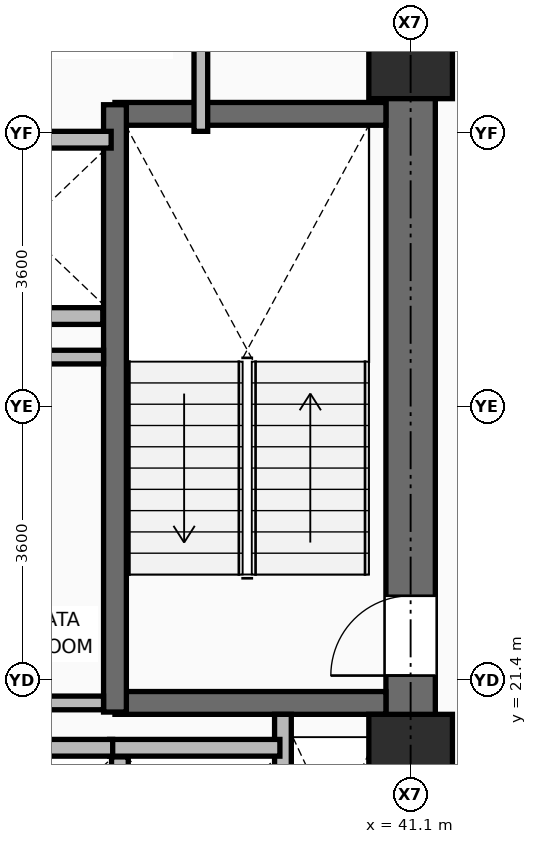
"""IFC4 building model, lengths in metres.
Left out: names, types, materials, properties, quantities, classifications, styles, units other than length and angle.
Written with IfcOpenShell. Run it as: python <this file> out.ifc"""

import sys

from ifc_helpers import new_model, si_unit, direction, frame, frame_2d, origin, origin_2d, place, context, subcontext, project, spatial, rectangle, extrude, element, fill, save


model = new_model("IFC4")
c1 = context("Model", 3, precision=1e-05, world=origin(), true_north=direction((0.0, 1.0)))
c2 = subcontext(c1, "Body", "Model", "MODEL_VIEW")
j1 = project(units=[si_unit("LENGTHUNIT", "METRE"), si_unit("PLANEANGLEUNIT", "RADIAN")], contexts=[c1])
p1 = place(None, origin())
s1 = spatial("IfcSite", under=j1, at=p1, CompositionType="ELEMENT")
p2 = place(p1, origin())
s2 = spatial("IfcBuilding", under=s1, at=p2, CompositionType="ELEMENT")
p3 = place(p2, frame((0.0, 0.0, 75.75)))
s3 = spatial("IfcBuildingStorey", under=s2, at=p3, CompositionType="ELEMENT", Elevation=75.75)
for number, where, z_axis, x_axis in (
    (1, (41.1, 20.4, 0.0), (0.0, 0.0, 1.0), (1.0, 0.0, 0.0)),
    (2, (41.1, 29.6, 0.0), (0.0, 0.0, 1.0), (1.0, 0.0, 0.0)),
):
    element("IfcColumn", number, at=place(p3, frame(where, z_axis=z_axis, x_axis=x_axis)), inside=s3, PredefinedType="COLUMN", context=c2, shape_type="SweptSolid", body=[
        extrude(rectangle(XDim=1.1, YDim=1.1, at=origin_2d()), origin(), (0.0, 0.0, 1.0), 3.75),
    ])
p4 = place(p3, frame((37.275, 18.08, 0.0), z_axis=(0.0, 0.0, 1.0), x_axis=(0.0, 1.0, 0.0)))
e3 = element("IfcWall", 3, at=p4, inside=s3, PredefinedType="PARTITIONING", context=c2, shape_type="SweptSolid", body=[
    extrude(rectangle(XDim=2.31, YDim=0.22, at=frame_2d((1.155, 0.0))), origin(), (0.0, 0.0, 1.0), 3.545),
])
p5 = place(p3, frame((34.91, 26.19, 0.0), z_axis=(0.0, 0.0, 1.0), x_axis=(1.0, 0.0, 0.0)))
e4 = element("IfcWall", 4, at=p5, inside=s3, PredefinedType="PARTITIONING", context=c2, shape_type="SweptSolid", body=[
    extrude(rectangle(XDim=2.14, YDim=0.22, at=frame_2d((1.07, 0.0))), origin(), (0.0, 0.0, 1.0), 3.545),
])
p6 = place(p3, frame((41.1, 18.125, 0.0), z_axis=(0.0, 0.0, 1.0), x_axis=(0.0, 1.0, 0.0)))
e5 = element("IfcWall", 5, at=p6, inside=s3, PredefinedType="SHEAR", context=c2, shape_type="SweptSolid", body=[
    extrude(rectangle(XDim=14.0, YDim=0.65, at=frame_2d((7.0, 0.0))), origin(), (0.0, 0.0, 1.0), 3.57),
])
p7 = place(p6, frame((3.335, 0.0, 0.0)))
e6 = element("IfcOpeningElement", 6, at=p7, cuts=e5, PredefinedType="OPENING", context=c2, shape_type="SweptSolid", body=[
    extrude(rectangle(XDim=1.05, YDim=2.1, at=frame_2d((0.525, 1.05))), frame((0.0, 0.335, 0.0), z_axis=(0.0, -1.0, 0.0), x_axis=(1.0, 0.0, 0.0)), (0.0, 0.0, 1.0), 0.67),
])
for number, where, z_axis, x_axis in (
    (7, (37.21, 21.1, 0.0), (0.0, 0.0, 1.0), (1.0, 0.0, 0.0)),
    (8, (37.21, 28.85, 0.0), (0.0, 0.0, 1.0), (1.0, 0.0, 0.0)),
):
    element("IfcWall", number, at=place(p3, frame(where, z_axis=z_axis, x_axis=x_axis)), inside=s3, PredefinedType="SHEAR", context=c2, shape_type="SweptSolid", body=[
        extrude(rectangle(XDim=3.565, YDim=0.3, at=frame_2d((1.782, 0.0))), origin(), (0.0, 0.0, 1.0), 3.57),
    ])
p8 = place(p3, frame((37.21, 20.98, 0.0), z_axis=(0.0, 0.0, 1.0), x_axis=(0.0, 1.0, 0.0)))
e9 = element("IfcWall", 9, at=p8, inside=s3, PredefinedType="SHEAR", context=c2, shape_type="SweptSolid", body=[
    extrude(rectangle(XDim=7.99, YDim=0.3, at=frame_2d((3.995, 0.0))), origin(), (0.0, 0.0, 1.0), 3.57),
])
p9 = place(p3, frame((39.42, 18.125, 0.0), z_axis=(0.0, 0.0, 1.0), x_axis=(0.0, 1.0, 0.0)))
e10 = element("IfcWall", 10, at=p9, inside=s3, PredefinedType="PARTITIONING", context=c2, shape_type="SweptSolid", body=[
    extrude(rectangle(XDim=2.825, YDim=0.22, at=frame_2d((1.413, 0.0))), origin(), (0.0, 0.0, 1.0), 3.55),
])
for number, where, z_axis, x_axis in (
    (11, (37.14, 20.51, 0.0), (0.0, 0.0, 1.0), (1.0, 0.0, 0.0)),
    (12, (34.94, 20.51, 0.0), (0.0, 0.0, 1.0), (1.0, 0.0, 0.0)),
):
    element("IfcWall", number, at=place(p3, frame(where, z_axis=z_axis, x_axis=x_axis)), inside=s3, PredefinedType="PARTITIONING", context=c2, shape_type="SweptSolid", body=[
        extrude(rectangle(XDim=2.24, YDim=0.22, at=frame_2d((1.12, 0.0))), origin(), (0.0, 0.0, 1.0), 3.55),
    ])
p10 = place(p3, frame((35.56, 28.51, 0.0), z_axis=(0.0, 0.0, 1.0), x_axis=(1.0, 0.0, 0.0)))
e13 = element("IfcWall", 13, at=p10, inside=s3, PredefinedType="PARTITIONING", context=c2, shape_type="SweptSolid", body=[
    extrude(rectangle(XDim=1.6, YDim=0.22, at=frame_2d((0.8, 0.0))), origin(), (0.0, 0.0, 1.0), 3.55),
])
p11 = place(p3, frame((34.98, 21.1, 0.0), z_axis=(0.0, 0.0, 1.0), x_axis=(1.0, 0.0, 0.0)))
e14 = element("IfcWall", 14, at=p11, inside=s3, PredefinedType="PARTITIONING", context=c2, shape_type="SweptSolid", body=[
    extrude(rectangle(XDim=2.08, YDim=0.18, at=frame_2d((1.04, 0.0))), origin(), (0.0, 0.0, 1.0), 3.55),
])
p12 = place(p3, frame((34.72, 25.65, 0.0), z_axis=(0.0, 0.0, 1.0), x_axis=(1.0, 0.0, 0.0)))
e15 = element("IfcWall", 15, at=p12, inside=s3, PredefinedType="PARTITIONING", context=c2, shape_type="SweptSolid", body=[
    extrude(rectangle(XDim=2.34, YDim=0.18, at=frame_2d((1.17, 0.0))), origin(), (0.0, 0.0, 1.0), 3.55),
])
p13 = place(p3, frame((38.34, 28.62, 0.0), z_axis=(0.0, 0.0, 1.0), x_axis=(0.0, 1.0, 0.0)))
e16 = element("IfcWall", 16, at=p13, inside=s3, PredefinedType="PARTITIONING", context=c2, shape_type="SweptSolid", body=[
    extrude(rectangle(XDim=3.505, YDim=0.18, at=frame_2d((1.752, 0.0))), origin(), (0.0, 0.0, 1.0), 3.55),
])
p14 = place(p7, origin())
e17 = element("IfcDoor", 17, at=p14, inside=s3, OperationType="SINGLE_SWING_LEFT", PredefinedType="DOOR", context=c2, shape_type="SweptSolid", body=[
    extrude(rectangle(XDim=1.05, YDim=2.1, at=frame_2d((0.525, 1.05))), frame((0.0, 0.025, 0.0), z_axis=(0.0, -1.0, 0.0), x_axis=(1.0, 0.0, 0.0)), (0.0, 0.0, 1.0), 0.05),
])
fill(e6, e17)
save(model, sys.argv[1])
